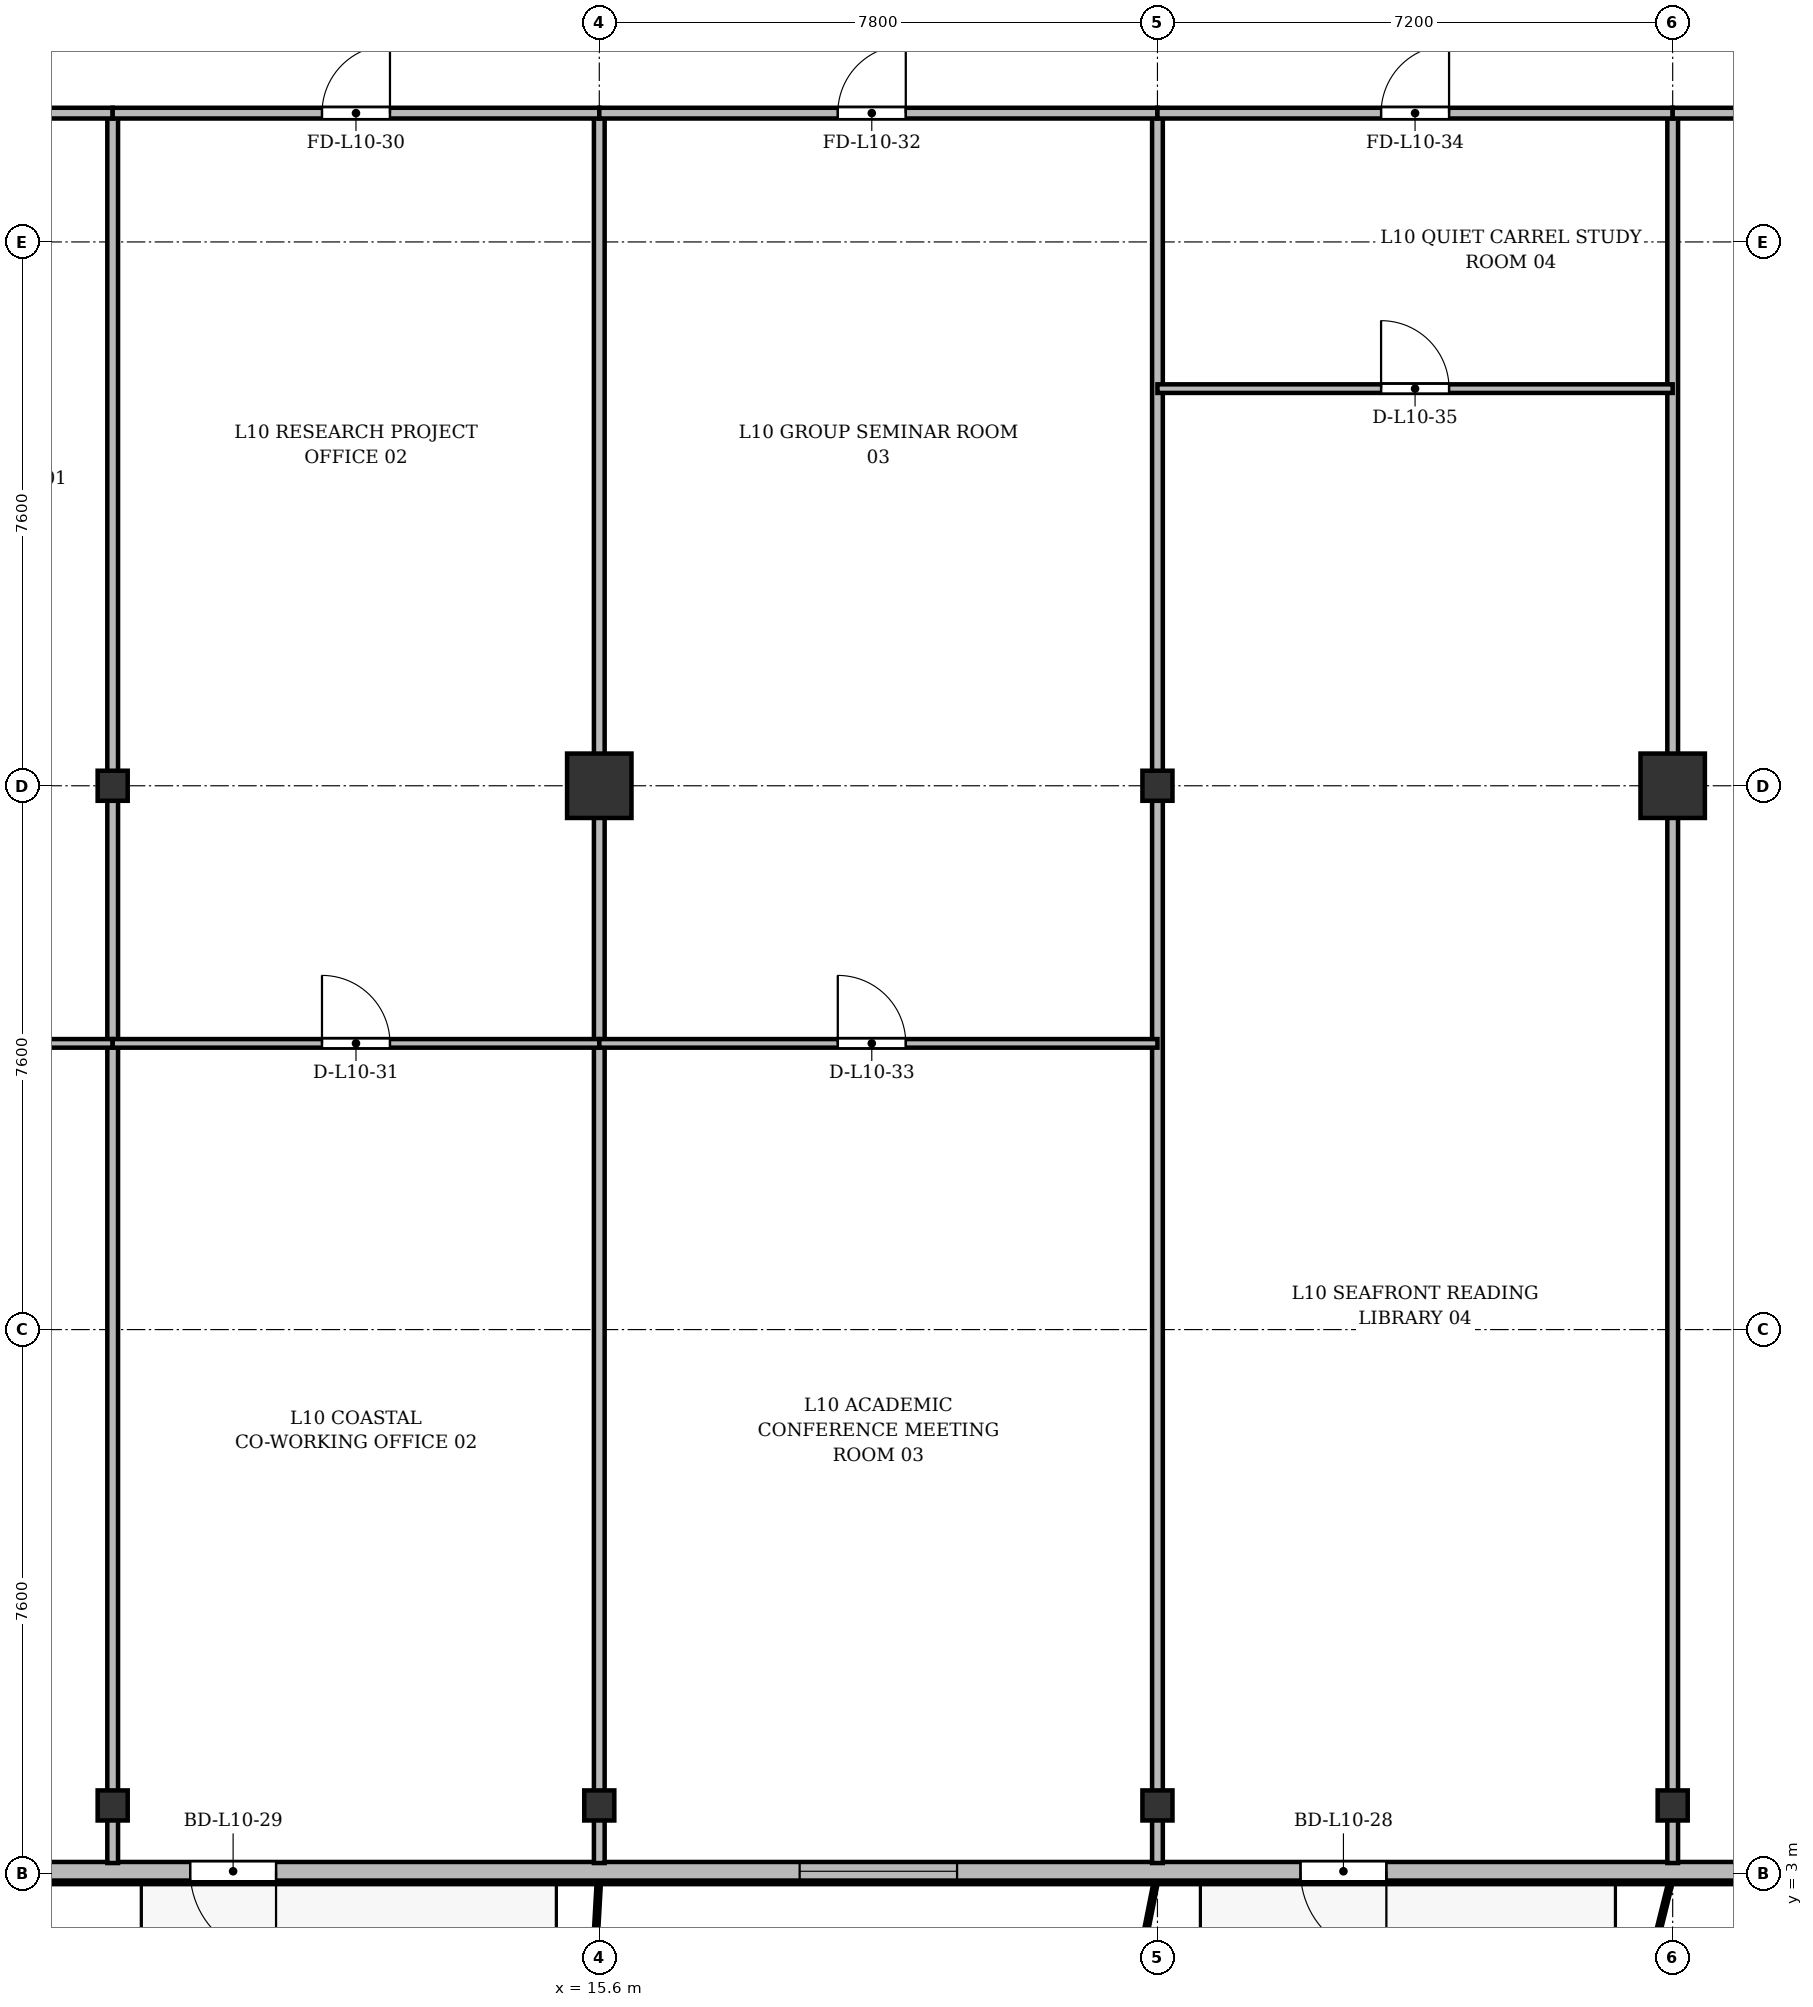
"""IFC4 building model, lengths in metres.
Left out: names, types, materials, properties, quantities, classifications, styles, units other than length and angle.
Written with IfcOpenShell. Run it as: python <this file> out.ifc"""

import sys

from ifc_helpers import new_model, si_unit, direction, frame, frame_2d, origin, origin_2d, place, context, subcontext, project, spatial, rectangle, i_section, extrude, source, transform, mapped, element, fill, save


model = new_model("IFC4")
c1 = context("Model", 3, precision=1e-05, world=origin(), true_north=direction((0.0, 1.0)))
c2 = subcontext(c1, "Body", "Model", "MODEL_VIEW")
j1 = project(units=[si_unit("LENGTHUNIT", "METRE"), si_unit("PLANEANGLEUNIT", "RADIAN")], contexts=[c1])
p1 = place(None, origin())
s1 = spatial("IfcSite", under=j1, at=p1, CompositionType="ELEMENT")
p2 = place(p1, origin())
s2 = spatial("IfcBuilding", under=s1, at=p2, CompositionType="ELEMENT")
p3 = place(p2, frame((0.0, 0.0, 41.5)))
s3 = spatial("IfcBuildingStorey", under=s2, at=p3, CompositionType="ELEMENT", Elevation=41.5)
m1 = source(origin(), c2, "Body", "SweptSolid", [
    extrude(i_section(OverallWidth=0.42, OverallDepth=0.42, WebThickness=0.026, FlangeThickness=0.04, at=origin_2d()), origin(), (0.0, 0.0, 1.0), 3.6),
])
for number, where, z_axis, x_axis in (
    (1, (8.8, 3.95, 0.0), (0.0, 0.0, 1.0), (1.0, 0.0, 0.0)),
    (2, (8.8, 18.2, 0.0), (0.0, 0.0, 1.0), (1.0, 0.0, 0.0)),
    (3, (15.6, 3.95, 0.0), (0.0, 0.0, 1.0), (1.0, 0.0, 0.0)),
):
    element("IfcColumn", number, at=place(p3, frame(where, z_axis=z_axis, x_axis=x_axis)), inside=s3, PredefinedType="COLUMN", context=c2, shape_type="MappedRepresentation", body=[
        mapped(m1, transform((0.0, 0.0, 0.0), x_axis=(1.0, 0.0, 0.0), y_axis=(0.0, 1.0, 0.0), z_axis=(0.0, 0.0, 1.0), scale=1.0)),
    ])
m2 = source(origin(), c2, "Body", "SweptSolid", [
    extrude(rectangle(XDim=0.9, YDim=0.9, at=origin_2d()), origin(), (0.0, 0.0, 1.0), 3.6),
])
p4 = place(p3, frame((15.6, 18.2, 0.0), z_axis=(0.0, 0.0, 1.0), x_axis=(1.0, 0.0, 0.0)))
e4 = element("IfcColumn", 4, at=p4, inside=s3, PredefinedType="COLUMN", context=c2, shape_type="MappedRepresentation", body=[
    mapped(m2, transform((0.0, 0.0, 0.0), x_axis=(1.0, 0.0, 0.0), y_axis=(0.0, 1.0, 0.0), z_axis=(0.0, 0.0, 1.0), scale=1.0)),
])
for number, where, z_axis, x_axis in (
    (5, (23.4, 3.95, 0.0), (0.0, 0.0, 1.0), (1.0, 0.0, 0.0)),
    (6, (23.4, 18.2, 0.0), (0.0, 0.0, 1.0), (1.0, 0.0, 0.0)),
    (7, (30.6, 3.95, 0.0), (0.0, 0.0, 1.0), (1.0, 0.0, 0.0)),
):
    element("IfcColumn", number, at=place(p3, frame(where, z_axis=z_axis, x_axis=x_axis)), inside=s3, PredefinedType="COLUMN", context=c2, shape_type="MappedRepresentation", body=[
        mapped(m1, transform((0.0, 0.0, 0.0), x_axis=(1.0, 0.0, 0.0), y_axis=(0.0, 1.0, 0.0), z_axis=(0.0, 0.0, 1.0), scale=1.0)),
    ])
p5 = place(p3, frame((30.6, 18.2, 0.0), z_axis=(0.0, 0.0, 1.0), x_axis=(1.0, 0.0, 0.0)))
e8 = element("IfcColumn", 8, at=p5, inside=s3, PredefinedType="COLUMN", context=c2, shape_type="MappedRepresentation", body=[
    mapped(m2, transform((0.0, 0.0, 0.0), x_axis=(1.0, 0.0, 0.0), y_axis=(0.0, 1.0, 0.0), z_axis=(0.0, 0.0, 1.0), scale=1.0)),
])
p6 = place(p3, frame((66.9, 3.03, 0.0), z_axis=(0.0, 0.0, 1.0), x_axis=(-1.0, 0.0, 0.0)))
e9 = element("IfcWall", 9, at=p6, inside=s3, PredefinedType="SOLIDWALL", context=c2, shape_type="SweptSolid", body=[
    extrude(rectangle(XDim=59.4, YDim=0.26, at=frame_2d((29.7, 0.0))), origin(), (0.0, 0.0, 1.0), 3.34),
])
p7 = place(p6, frame((3.6, 0.0, 0.9)))
e10 = element("IfcOpeningElement", 10, at=p7, cuts=e9, PredefinedType="OPENING", context=c2, shape_type="SweptSolid", body=[
    extrude(rectangle(XDim=2.2, YDim=1.8, at=frame_2d((1.1, 0.9))), frame((0.0, 0.14, 0.0), z_axis=(0.0, -1.0, 0.0), x_axis=(1.0, 0.0, 0.0)), (0.0, 0.0, 1.0), 0.28),
])
p8 = place(p6, frame((9.565, 0.0, 0.0)))
e11 = element("IfcOpeningElement", 11, at=p8, cuts=e9, PredefinedType="OPENING", context=c2, shape_type="SweptSolid", body=[
    extrude(rectangle(XDim=1.2, YDim=2.2, at=frame_2d((0.6, 1.1))), frame((0.0, 0.14, 0.0), z_axis=(0.0, -1.0, 0.0), x_axis=(1.0, 0.0, 0.0)), (0.0, 0.0, 1.0), 0.28),
])
p9 = place(p6, frame((18.5, 0.0, 0.9)))
e12 = element("IfcOpeningElement", 12, at=p9, cuts=e9, PredefinedType="OPENING", context=c2, shape_type="SweptSolid", body=[
    extrude(rectangle(XDim=2.0, YDim=1.95, at=frame_2d((1.0, 0.975))), frame((0.0, 0.14, 0.0), z_axis=(0.0, -1.0, 0.0), x_axis=(1.0, 0.0, 0.0)), (0.0, 0.0, 1.0), 0.28),
])
p10 = place(p6, frame((28.875, 0.0, 0.9)))
e13 = element("IfcOpeningElement", 13, at=p10, cuts=e9, PredefinedType="OPENING", context=c2, shape_type="SweptSolid", body=[
    extrude(rectangle(XDim=1.65, YDim=1.85, at=frame_2d((0.825, 0.925))), frame((0.0, 0.14, 0.0), z_axis=(0.0, -1.0, 0.0), x_axis=(1.0, 0.0, 0.0)), (0.0, 0.0, 1.0), 0.28),
])
p11 = place(p6, frame((40.301, 0.0, 0.0)))
e14 = element("IfcOpeningElement", 14, at=p11, cuts=e9, PredefinedType="OPENING", context=c2, shape_type="SweptSolid", body=[
    extrude(rectangle(XDim=1.2, YDim=2.2, at=frame_2d((0.6, 1.1))), frame((0.0, 0.14, 0.0), z_axis=(0.0, -1.0, 0.0), x_axis=(1.0, 0.0, 0.0)), (0.0, 0.0, 1.0), 0.28),
])
p12 = place(p6, frame((46.3, 0.0, 0.9)))
e15 = element("IfcOpeningElement", 15, at=p12, cuts=e9, PredefinedType="OPENING", context=c2, shape_type="SweptSolid", body=[
    extrude(rectangle(XDim=2.2, YDim=1.8, at=frame_2d((1.1, 0.9))), frame((0.0, 0.14, 0.0), z_axis=(0.0, -1.0, 0.0), x_axis=(1.0, 0.0, 0.0)), (0.0, 0.0, 1.0), 0.28),
])
p13 = place(p6, frame((55.817, 0.0, 0.0)))
e16 = element("IfcOpeningElement", 16, at=p13, cuts=e9, PredefinedType="OPENING", context=c2, shape_type="SweptSolid", body=[
    extrude(rectangle(XDim=1.2, YDim=2.2, at=frame_2d((0.6, 1.1))), frame((0.0, 0.14, 0.0), z_axis=(0.0, -1.0, 0.0), x_axis=(1.0, 0.0, 0.0)), (0.0, 0.0, 1.0), 0.28),
])
for number, where, z_axis, x_axis in (
    (17, (8.8, 3.145, 0.0), (0.0, 0.0, 1.0), (0.0, 1.0, 0.0)),
    (18, (15.6, 3.145, 0.0), (0.0, 0.0, 1.0), (0.0, 1.0, 0.0)),
    (19, (23.4, 3.145, 0.0), (0.0, 0.0, 1.0), (0.0, 1.0, 0.0)),
    (20, (30.6, 3.145, 0.0), (0.0, 0.0, 1.0), (0.0, 1.0, 0.0)),
):
    element("IfcWall", number, at=place(p3, frame(where, z_axis=z_axis, x_axis=x_axis)), inside=s3, PredefinedType="PARTITIONING", context=c2, shape_type="SweptSolid", body=[
        extrude(rectangle(XDim=24.455, YDim=0.15, at=frame_2d((12.228, 0.0))), origin(), (0.0, 0.0, 1.0), 2.752),
    ])
p14 = place(p3, frame((4.745, 27.6, 0.0), z_axis=(0.0, 0.0, 1.0), x_axis=(1.0, 0.0, 0.0)))
e21 = element("IfcWall", 21, at=p14, inside=s3, PredefinedType="PARTITIONING", context=c2, shape_type="SweptSolid", body=[
    extrude(rectangle(XDim=4.055, YDim=0.15, at=frame_2d((2.027, 0.0))), origin(), (0.0, 0.0, 1.0), 2.752),
])
p15 = place(p14, frame((1.462, 0.0, 0.0)))
e22 = element("IfcOpeningElement", 22, at=p15, cuts=e21, PredefinedType="OPENING", context=c2, shape_type="SweptSolid", body=[
    extrude(rectangle(XDim=0.95, YDim=2.15, at=frame_2d((0.475, 1.075))), frame((0.0, 0.085, 0.0), z_axis=(0.0, -1.0, 0.0), x_axis=(1.0, 0.0, 0.0)), (0.0, 0.0, 1.0), 0.17),
])
p16 = place(p3, frame((4.745, 14.6, 0.0), z_axis=(0.0, 0.0, 1.0), x_axis=(1.0, 0.0, 0.0)))
e23 = element("IfcWall", 23, at=p16, inside=s3, PredefinedType="PARTITIONING", context=c2, shape_type="SweptSolid", body=[
    extrude(rectangle(XDim=4.055, YDim=0.12, at=frame_2d((2.027, 0.0))), origin(), (0.0, 0.0, 1.0), 2.752),
])
p17 = place(p16, frame((1.462, 0.0, 0.0)))
e24 = element("IfcOpeningElement", 24, at=p17, cuts=e23, PredefinedType="OPENING", context=c2, shape_type="SweptSolid", body=[
    extrude(rectangle(XDim=0.95, YDim=2.15, at=frame_2d((0.475, 1.075))), frame((0.0, 0.07, 0.0), z_axis=(0.0, -1.0, 0.0), x_axis=(1.0, 0.0, 0.0)), (0.0, 0.0, 1.0), 0.14),
])
p18 = place(p3, frame((8.8, 27.6, 0.0), z_axis=(0.0, 0.0, 1.0), x_axis=(1.0, 0.0, 0.0)))
e25 = element("IfcWall", 25, at=p18, inside=s3, PredefinedType="PARTITIONING", context=c2, shape_type="SweptSolid", body=[
    extrude(rectangle(XDim=6.8, YDim=0.15, at=frame_2d((3.4, 0.0))), origin(), (0.0, 0.0, 1.0), 2.752),
])
p19 = place(p18, frame((2.925, 0.0, 0.0)))
e26 = element("IfcOpeningElement", 26, at=p19, cuts=e25, PredefinedType="OPENING", context=c2, shape_type="SweptSolid", body=[
    extrude(rectangle(XDim=0.95, YDim=2.15, at=frame_2d((0.475, 1.075))), frame((0.0, 0.085, 0.0), z_axis=(0.0, -1.0, 0.0), x_axis=(1.0, 0.0, 0.0)), (0.0, 0.0, 1.0), 0.17),
])
p20 = place(p3, frame((8.8, 14.6, 0.0), z_axis=(0.0, 0.0, 1.0), x_axis=(1.0, 0.0, 0.0)))
e27 = element("IfcWall", 27, at=p20, inside=s3, PredefinedType="PARTITIONING", context=c2, shape_type="SweptSolid", body=[
    extrude(rectangle(XDim=6.8, YDim=0.12, at=frame_2d((3.4, 0.0))), origin(), (0.0, 0.0, 1.0), 2.752),
])
p21 = place(p20, frame((2.925, 0.0, 0.0)))
e28 = element("IfcOpeningElement", 28, at=p21, cuts=e27, PredefinedType="OPENING", context=c2, shape_type="SweptSolid", body=[
    extrude(rectangle(XDim=0.95, YDim=2.15, at=frame_2d((0.475, 1.075))), frame((0.0, 0.07, 0.0), z_axis=(0.0, -1.0, 0.0), x_axis=(1.0, 0.0, 0.0)), (0.0, 0.0, 1.0), 0.14),
])
p22 = place(p3, frame((15.6, 27.6, 0.0), z_axis=(0.0, 0.0, 1.0), x_axis=(1.0, 0.0, 0.0)))
e29 = element("IfcWall", 29, at=p22, inside=s3, PredefinedType="PARTITIONING", context=c2, shape_type="SweptSolid", body=[
    extrude(rectangle(XDim=7.8, YDim=0.15, at=frame_2d((3.9, 0.0))), origin(), (0.0, 0.0, 1.0), 2.752),
])
p23 = place(p22, frame((3.333, 0.0, 0.0)))
e30 = element("IfcOpeningElement", 30, at=p23, cuts=e29, PredefinedType="OPENING", context=c2, shape_type="SweptSolid", body=[
    extrude(rectangle(XDim=0.95, YDim=2.15, at=frame_2d((0.475, 1.075))), frame((0.0, 0.085, 0.0), z_axis=(0.0, -1.0, 0.0), x_axis=(1.0, 0.0, 0.0)), (0.0, 0.0, 1.0), 0.17),
])
p24 = place(p3, frame((15.6, 14.6, 0.0), z_axis=(0.0, 0.0, 1.0), x_axis=(1.0, 0.0, 0.0)))
e31 = element("IfcWall", 31, at=p24, inside=s3, PredefinedType="PARTITIONING", context=c2, shape_type="SweptSolid", body=[
    extrude(rectangle(XDim=7.8, YDim=0.12, at=frame_2d((3.9, 0.0))), origin(), (0.0, 0.0, 1.0), 2.752),
])
p25 = place(p24, frame((3.333, 0.0, 0.0)))
e32 = element("IfcOpeningElement", 32, at=p25, cuts=e31, PredefinedType="OPENING", context=c2, shape_type="SweptSolid", body=[
    extrude(rectangle(XDim=0.95, YDim=2.15, at=frame_2d((0.475, 1.075))), frame((0.0, 0.07, 0.0), z_axis=(0.0, -1.0, 0.0), x_axis=(1.0, 0.0, 0.0)), (0.0, 0.0, 1.0), 0.14),
])
p26 = place(p3, frame((23.4, 27.6, 0.0), z_axis=(0.0, 0.0, 1.0), x_axis=(1.0, 0.0, 0.0)))
e33 = element("IfcWall", 33, at=p26, inside=s3, PredefinedType="PARTITIONING", context=c2, shape_type="SweptSolid", body=[
    extrude(rectangle(XDim=7.2, YDim=0.15, at=frame_2d((3.6, 0.0))), origin(), (0.0, 0.0, 1.0), 2.752),
])
p27 = place(p26, frame((3.125, 0.0, 0.0)))
e34 = element("IfcOpeningElement", 34, at=p27, cuts=e33, PredefinedType="OPENING", context=c2, shape_type="SweptSolid", body=[
    extrude(rectangle(XDim=0.95, YDim=2.15, at=frame_2d((0.475, 1.075))), frame((0.0, 0.085, 0.0), z_axis=(0.0, -1.0, 0.0), x_axis=(1.0, 0.0, 0.0)), (0.0, 0.0, 1.0), 0.17),
])
p28 = place(p3, frame((23.4, 23.75, 0.0), z_axis=(0.0, 0.0, 1.0), x_axis=(1.0, 0.0, 0.0)))
e35 = element("IfcWall", 35, at=p28, inside=s3, PredefinedType="PARTITIONING", context=c2, shape_type="SweptSolid", body=[
    extrude(rectangle(XDim=7.2, YDim=0.12, at=frame_2d((3.6, 0.0))), origin(), (0.0, 0.0, 1.0), 2.752),
])
p29 = place(p28, frame((3.125, 0.0, 0.0)))
e36 = element("IfcOpeningElement", 36, at=p29, cuts=e35, PredefinedType="OPENING", context=c2, shape_type="SweptSolid", body=[
    extrude(rectangle(XDim=0.95, YDim=2.15, at=frame_2d((0.475, 1.075))), frame((0.0, 0.07, 0.0), z_axis=(0.0, -1.0, 0.0), x_axis=(1.0, 0.0, 0.0)), (0.0, 0.0, 1.0), 0.14),
])
p30 = place(p3, frame((30.6, 27.6, 0.0), z_axis=(0.0, 0.0, 1.0), x_axis=(1.0, 0.0, 0.0)))
e37 = element("IfcWall", 37, at=p30, inside=s3, PredefinedType="PARTITIONING", context=c2, shape_type="SweptSolid", body=[
    extrude(rectangle(XDim=13.2, YDim=0.15, at=frame_2d((6.6, 0.0))), origin(), (0.0, 0.0, 1.0), 2.752),
])
p31 = place(p30, frame((5.8, 0.0, 0.0)))
e38 = element("IfcOpeningElement", 38, at=p31, cuts=e37, PredefinedType="OPENING", context=c2, shape_type="SweptSolid", body=[
    extrude(rectangle(XDim=1.6, YDim=2.2, at=frame_2d((0.8, 1.1))), frame((0.0, 0.085, 0.0), z_axis=(0.0, -1.0, 0.0), x_axis=(1.0, 0.0, 0.0)), (0.0, 0.0, 1.0), 0.17),
])
m3 = source(origin(), c2, "Body", "SweptSolid", [
    extrude(rectangle(XDim=1.2, YDim=2.2, at=frame_2d((0.6, 1.1))), frame((0.0, 0.025, 0.0), z_axis=(0.0, -1.0, 0.0), x_axis=(1.0, 0.0, 0.0)), (0.0, 0.0, 1.0), 0.05),
])
p32 = place(p11, origin())
e39 = element("IfcDoor", 39, at=p32, inside=s3, OperationType="SINGLE_SWING_LEFT", PredefinedType="DOOR", context=c2, shape_type="MappedRepresentation", body=[
    mapped(m3, transform((0.0, 0.0, 0.0), x_axis=(1.0, 0.0, 0.0), y_axis=(0.0, 1.0, 0.0), z_axis=(0.0, 0.0, 1.0), scale=1.0)),
])
fill(e14, e39)
m4 = source(origin(), c2, "Body", "SweptSolid", [
    extrude(rectangle(XDim=2.2, YDim=1.8, at=frame_2d((1.1, 0.9))), frame((0.0, 0.03, 0.0), z_axis=(0.0, -1.0, 0.0), x_axis=(1.0, 0.0, 0.0)), (0.0, 0.0, 1.0), 0.06),
])
p33 = place(p12, origin())
e40 = element("IfcWindow", 40, at=p33, inside=s3, PartitioningType="SINGLE_PANEL", PredefinedType="WINDOW", context=c2, shape_type="MappedRepresentation", body=[
    mapped(m4, transform((0.0, 0.0, 0.0), x_axis=(1.0, 0.0, 0.0), y_axis=(0.0, 1.0, 0.0), z_axis=(0.0, 0.0, 1.0), scale=1.0)),
])
fill(e15, e40)
p34 = place(p13, origin())
e41 = element("IfcDoor", 41, at=p34, inside=s3, OperationType="SINGLE_SWING_LEFT", PredefinedType="DOOR", context=c2, shape_type="MappedRepresentation", body=[
    mapped(m3, transform((0.0, 0.0, 0.0), x_axis=(1.0, 0.0, 0.0), y_axis=(0.0, 1.0, 0.0), z_axis=(0.0, 0.0, 1.0), scale=1.0)),
])
fill(e16, e41)
m5 = source(origin(), c2, "Body", "SweptSolid", [
    extrude(rectangle(XDim=0.95, YDim=2.15, at=frame_2d((0.475, 1.075))), frame((0.0, 0.025, 0.0), z_axis=(0.0, -1.0, 0.0), x_axis=(1.0, 0.0, 0.0)), (0.0, 0.0, 1.0), 0.05),
])
p35 = place(p19, origin())
e42 = element("IfcDoor", 42, at=p35, inside=s3, OperationType="SINGLE_SWING_RIGHT", PredefinedType="DOOR", context=c2, shape_type="MappedRepresentation", body=[
    mapped(m5, transform((0.0, 0.0, 0.0), x_axis=(1.0, 0.0, 0.0), y_axis=(0.0, 1.0, 0.0), z_axis=(0.0, 0.0, 1.0), scale=1.0)),
])
fill(e26, e42)
p36 = place(p21, origin())
e43 = element("IfcDoor", 43, at=p36, inside=s3, OperationType="SINGLE_SWING_LEFT", PredefinedType="DOOR", context=c2, shape_type="MappedRepresentation", body=[
    mapped(m5, transform((0.0, 0.0, 0.0), x_axis=(1.0, 0.0, 0.0), y_axis=(0.0, 1.0, 0.0), z_axis=(0.0, 0.0, 1.0), scale=1.0)),
])
fill(e28, e43)
p37 = place(p23, origin())
e44 = element("IfcDoor", 44, at=p37, inside=s3, OperationType="SINGLE_SWING_RIGHT", PredefinedType="DOOR", context=c2, shape_type="MappedRepresentation", body=[
    mapped(m5, transform((0.0, 0.0, 0.0), x_axis=(1.0, 0.0, 0.0), y_axis=(0.0, 1.0, 0.0), z_axis=(0.0, 0.0, 1.0), scale=1.0)),
])
fill(e30, e44)
p38 = place(p25, origin())
e45 = element("IfcDoor", 45, at=p38, inside=s3, OperationType="SINGLE_SWING_LEFT", PredefinedType="DOOR", context=c2, shape_type="MappedRepresentation", body=[
    mapped(m5, transform((0.0, 0.0, 0.0), x_axis=(1.0, 0.0, 0.0), y_axis=(0.0, 1.0, 0.0), z_axis=(0.0, 0.0, 1.0), scale=1.0)),
])
fill(e32, e45)
p39 = place(p27, origin())
e46 = element("IfcDoor", 46, at=p39, inside=s3, OperationType="SINGLE_SWING_RIGHT", PredefinedType="DOOR", context=c2, shape_type="MappedRepresentation", body=[
    mapped(m5, transform((0.0, 0.0, 0.0), x_axis=(1.0, 0.0, 0.0), y_axis=(0.0, 1.0, 0.0), z_axis=(0.0, 0.0, 1.0), scale=1.0)),
])
fill(e34, e46)
p40 = place(p29, origin())
e47 = element("IfcDoor", 47, at=p40, inside=s3, OperationType="SINGLE_SWING_LEFT", PredefinedType="DOOR", context=c2, shape_type="MappedRepresentation", body=[
    mapped(m5, transform((0.0, 0.0, 0.0), x_axis=(1.0, 0.0, 0.0), y_axis=(0.0, 1.0, 0.0), z_axis=(0.0, 0.0, 1.0), scale=1.0)),
])
fill(e36, e47)
save(model, sys.argv[1])
